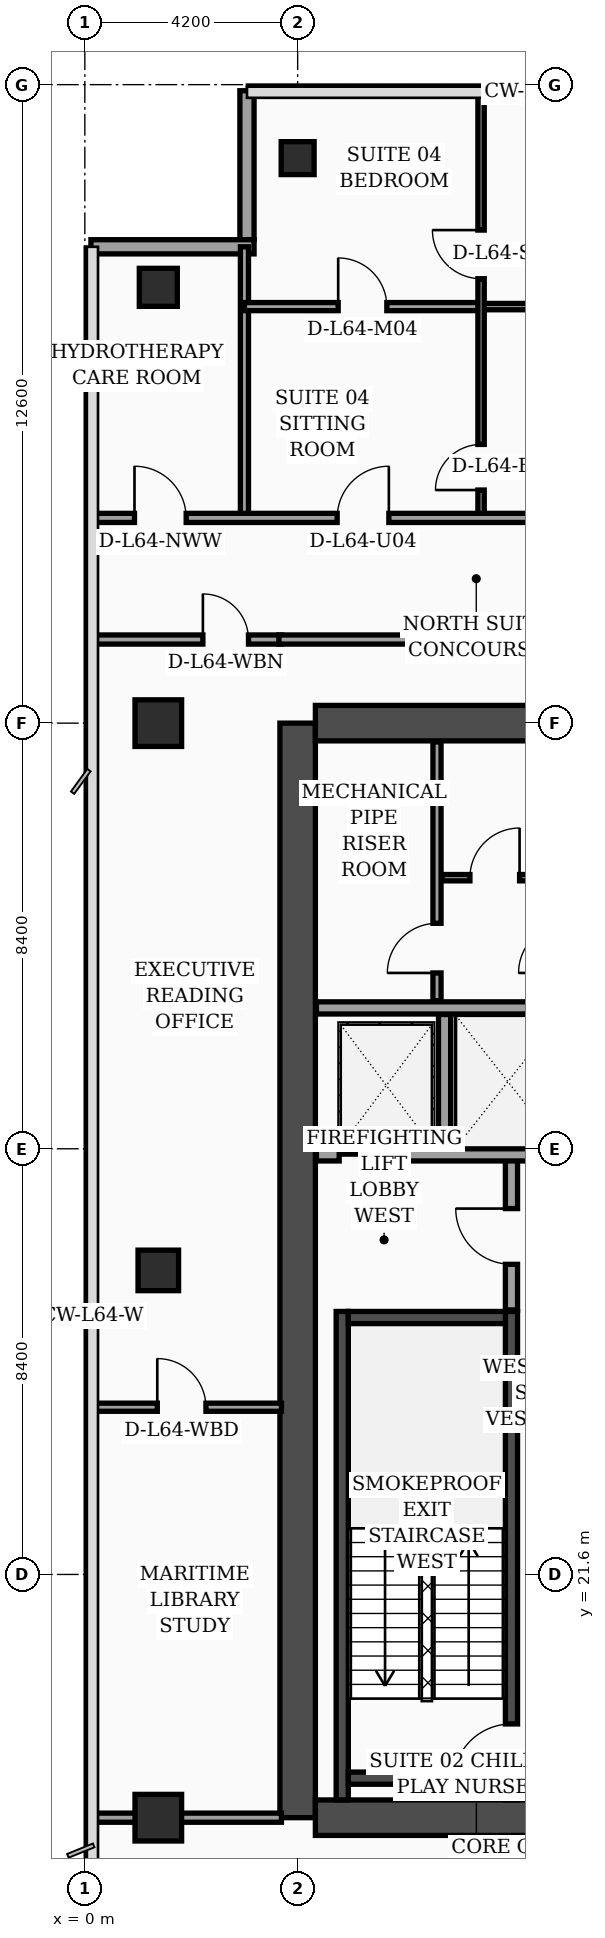
"""IFC4 building model, lengths in metres.
Left out: names, types, materials, properties, quantities, classifications, styles, units other than length and angle.
Written with IfcOpenShell. Run it as: python <this file> out.ifc"""

import sys

from ifc_helpers import new_model, si_unit, direction, frame, frame_2d, origin, origin_2d, place, context, subcontext, project, spatial, rectangle, hollow_rectangle, extrude, element, fill, save


model = new_model("IFC4")
c1 = context("Model", 3, precision=1e-05, world=origin(), true_north=direction((0.0, 1.0)))
c2 = subcontext(c1, "Body", "Model", "MODEL_VIEW")
j1 = project(units=[si_unit("LENGTHUNIT", "METRE"), si_unit("PLANEANGLEUNIT", "RADIAN")], contexts=[c1])
p1 = place(None, origin())
s1 = spatial("IfcSite", under=j1, at=p1, CompositionType="ELEMENT")
p2 = place(p1, origin())
s2 = spatial("IfcBuilding", under=s1, at=p2, CompositionType="ELEMENT")
p3 = place(p2, frame((0.0, 0.0, 259.0)))
s3 = spatial("IfcBuildingStorey", under=s2, at=p3, CompositionType="ELEMENT", Elevation=259.0)
p4 = place(p3, frame((4.2, 16.8, 0.0), z_axis=(0.0, 0.0, 1.0), x_axis=(0.0, 1.0, 0.0)))
e1 = element("IfcWall", 1, at=p4, inside=s3, PredefinedType="SHEAR", context=c2, shape_type="SweptSolid", body=[
    extrude(rectangle(XDim=21.6, YDim=0.7, at=frame_2d((10.8, 0.0))), origin(), (0.0, 0.0, 1.0), 4.05),
])
p5 = place(p3, frame((4.55, 38.4, 0.0), z_axis=(0.0, 0.0, 1.0), x_axis=(1.0, 0.0, 0.0)))
e2 = element("IfcWall", 2, at=p5, inside=s3, PredefinedType="SHEAR", context=c2, shape_type="SweptSolid", body=[
    extrude(rectangle(XDim=10.1, YDim=0.7, at=frame_2d((5.05, 0.0))), origin(), (0.0, 0.0, 1.0), 4.05),
])
p6 = place(p5, frame((5.75, 0.0, 0.0)))
e3 = element("IfcOpeningElement", 3, at=p6, cuts=e2, PredefinedType="OPENING", context=c2, shape_type="SweptSolid", body=[
    extrude(rectangle(XDim=1.1, YDim=2.2, at=frame_2d((0.55, 1.1))), frame((0.0, 0.36, 0.0), z_axis=(0.0, -1.0, 0.0), x_axis=(1.0, 0.0, 0.0)), (0.0, 0.0, 1.0), 0.72),
])
p7 = place(p3, frame((4.55, 16.8, 0.0), z_axis=(0.0, 0.0, 1.0), x_axis=(1.0, 0.0, 0.0)))
e4 = element("IfcWall", 4, at=p7, inside=s3, PredefinedType="SHEAR", context=c2, shape_type="SweptSolid", body=[
    extrude(rectangle(XDim=10.1, YDim=0.7, at=frame_2d((5.05, 0.0))), origin(), (0.0, 0.0, 1.0), 4.05),
])
p8 = place(p3, frame((5.08, 17.15, 0.0), z_axis=(0.0, 0.0, 1.0), x_axis=(0.0, 1.0, 0.0)))
e5 = element("IfcWall", 5, at=p8, inside=s3, PredefinedType="SOLIDWALL", context=c2, shape_type="SweptSolid", body=[
    extrude(rectangle(XDim=9.64, YDim=0.24, at=frame_2d((4.82, 0.0))), origin(), (0.0, 0.0, 1.0), 4.05),
])
p9 = place(p3, frame((8.42, 17.15, 0.0), z_axis=(0.0, 0.0, 1.0), x_axis=(0.0, 1.0, 0.0)))
e6 = element("IfcWall", 6, at=p9, inside=s3, PredefinedType="SOLIDWALL", context=c2, shape_type="SweptSolid", body=[
    extrude(rectangle(XDim=9.64, YDim=0.24, at=frame_2d((4.82, 0.0))), origin(), (0.0, 0.0, 1.0), 4.05),
])
p10 = place(p9, frame((0.35, 0.0, 0.0)))
e7 = element("IfcOpeningElement", 7, at=p10, cuts=e6, PredefinedType="OPENING", context=c2, shape_type="SweptSolid", body=[
    extrude(rectangle(XDim=1.15, YDim=2.2, at=frame_2d((0.575, 1.1))), frame((0.0, 0.13, 0.0), z_axis=(0.0, -1.0, 0.0), x_axis=(1.0, 0.0, 0.0)), (0.0, 0.0, 1.0), 0.26),
])
for number, where, z_axis, x_axis in (
    (8, (5.2, 17.58, 0.0), (0.0, 0.0, 1.0), (1.0, 0.0, 0.0)),
    (9, (5.2, 26.67, 0.0), (0.0, 0.0, 1.0), (1.0, 0.0, 0.0)),
):
    element("IfcWall", number, at=place(p3, frame(where, z_axis=z_axis, x_axis=x_axis)), inside=s3, PredefinedType="SOLIDWALL", context=c2, shape_type="SweptSolid", body=[
        extrude(rectangle(XDim=3.1, YDim=0.24, at=frame_2d((1.55, 0.0))), origin(), (0.0, 0.0, 1.0), 4.05),
    ])
p11 = place(p3, frame((1.45, 16.8, 0.0), z_axis=(0.0, 0.0, 1.0), x_axis=(1.0, 0.0, 0.0)))
e10 = element("IfcColumn", 10, at=p11, inside=s3, PredefinedType="COLUMN", context=c2, shape_type="SweptSolid", body=[
    extrude(rectangle(XDim=0.92, YDim=0.92, at=origin_2d()), origin(), (0.0, 0.0, 1.0), 4.05),
])
p12 = place(p3, frame((1.45, 27.6, 0.0), z_axis=(0.0, 0.0, 1.0), x_axis=(1.0, 0.0, 0.0)))
e11 = element("IfcColumn", 11, at=p12, inside=s3, PredefinedType="COLUMN", context=c2, shape_type="SweptSolid", body=[
    extrude(rectangle(XDim=0.8, YDim=0.8, at=origin_2d()), origin(), (0.0, 0.0, 1.0), 4.05),
])
p13 = place(p3, frame((1.45, 38.4, 0.0), z_axis=(0.0, 0.0, 1.0), x_axis=(1.0, 0.0, 0.0)))
e12 = element("IfcColumn", 12, at=p13, inside=s3, PredefinedType="COLUMN", context=c2, shape_type="SweptSolid", body=[
    extrude(rectangle(XDim=0.92, YDim=0.92, at=origin_2d()), origin(), (0.0, 0.0, 1.0), 4.05),
])
p14 = place(p3, frame((1.45, 47.0, 0.0), z_axis=(0.0, 0.0, 1.0), x_axis=(1.0, 0.0, 0.0)))
e13 = element("IfcColumn", 13, at=p14, inside=s3, PredefinedType="COLUMN", context=c2, shape_type="SweptSolid", body=[
    extrude(hollow_rectangle(XDim=0.75, YDim=0.75, WallThickness=0.032, at=origin_2d()), origin(), (0.0, 0.0, 1.0), 4.05),
])
p15 = place(p3, frame((4.2, 49.55, 0.0), z_axis=(0.0, 0.0, 1.0), x_axis=(1.0, 0.0, 0.0)))
e14 = element("IfcColumn", 14, at=p15, inside=s3, PredefinedType="COLUMN", context=c2, shape_type="SweptSolid", body=[
    extrude(hollow_rectangle(XDim=0.65, YDim=0.65, WallThickness=0.028, at=origin_2d()), origin(), (0.0, 0.0, 1.0), 4.05),
])
p16 = place(p3, frame((3.2, 50.88, 0.0), z_axis=(0.0, 0.0, 1.0), x_axis=(0.0, -1.0, 0.0)))
e15 = element("IfcWall", 15, at=p16, inside=s3, PredefinedType="SOLIDWALL", context=c2, shape_type="SweptSolid", body=[
    extrude(rectangle(XDim=2.94, YDim=0.28, at=frame_2d((1.47, 0.0))), origin(), (0.0, 0.0, 1.0), 3.6),
])
p17 = place(p3, frame((3.34, 47.8, 0.0), z_axis=(0.0, 0.0, 1.0), x_axis=(-1.0, 0.0, 0.0)))
e16 = element("IfcWall", 16, at=p17, inside=s3, PredefinedType="SOLIDWALL", context=c2, shape_type="SweptSolid", body=[
    extrude(rectangle(XDim=3.22, YDim=0.28, at=frame_2d((1.61, 0.0))), origin(), (0.0, 0.0, 1.0), 3.6),
])
p18 = place(p3, frame((8.42, 26.82, 0.0), z_axis=(0.0, 0.0, 1.0), x_axis=(0.0, 1.0, 0.0)))
e17 = element("IfcWall", 17, at=p18, inside=s3, PredefinedType="SOLIDWALL", context=c2, shape_type="SweptSolid", body=[
    extrude(rectangle(XDim=3.0, YDim=0.24, at=frame_2d((1.5, 0.0))), origin(), (0.0, 0.0, 1.0), 4.05),
])
p19 = place(p18, frame((0.9, 0.0, 0.0)))
e18 = element("IfcOpeningElement", 18, at=p19, cuts=e17, PredefinedType="OPENING", context=c2, shape_type="SweptSolid", body=[
    extrude(rectangle(XDim=1.1, YDim=2.2, at=frame_2d((0.55, 1.1))), frame((0.0, 0.13, 0.0), z_axis=(0.0, -1.0, 0.0), x_axis=(1.0, 0.0, 0.0)), (0.0, 0.0, 1.0), 0.26),
])
p20 = place(p3, frame((4.57, 29.88, 0.0), z_axis=(0.0, 0.0, 1.0), x_axis=(1.0, 0.0, 0.0)))
e19 = element("IfcWall", 19, at=p20, inside=s3, PredefinedType="SOLIDWALL", context=c2, shape_type="SweptSolid", body=[
    extrude(rectangle(XDim=4.85, YDim=0.24, at=frame_2d((2.425, 0.0))), origin(), (0.0, 0.0, 1.0), 4.05),
])
p21 = place(p20, frame((0.45, 0.0, 0.0)))
e20 = element("IfcOpeningElement", 20, at=p21, cuts=e19, PredefinedType="OPENING", context=c2, shape_type="SweptSolid", body=[
    extrude(rectangle(XDim=1.3, YDim=2.35, at=frame_2d((0.65, 1.175))), frame((0.0, 0.13, 0.0), z_axis=(0.0, -1.0, 0.0), x_axis=(1.0, 0.0, 0.0)), (0.0, 0.0, 1.0), 0.26),
])
p22 = place(p3, frame((7.1, 30.02, 0.0), z_axis=(0.0, 0.0, 1.0), x_axis=(0.0, 1.0, 0.0)))
e21 = element("IfcWall", 21, at=p22, inside=s3, PredefinedType="SOLIDWALL", context=c2, shape_type="SweptSolid", body=[
    extrude(rectangle(XDim=2.63, YDim=0.24, at=frame_2d((1.315, 0.0))), origin(), (0.0, 0.0, 1.0), 4.05),
])
p23 = place(p3, frame((4.57, 32.78, 0.0), z_axis=(0.0, 0.0, 1.0), x_axis=(1.0, 0.0, 0.0)))
e22 = element("IfcWall", 22, at=p23, inside=s3, PredefinedType="SOLIDWALL", context=c2, shape_type="SweptSolid", body=[
    extrude(rectangle(XDim=4.85, YDim=0.24, at=frame_2d((2.425, 0.0))), origin(), (0.0, 0.0, 1.0), 3.7),
])
p24 = place(p3, frame((6.95, 32.92, 0.0), z_axis=(0.0, 0.0, 1.0), x_axis=(0.0, 1.0, 0.0)))
e23 = element("IfcWall", 23, at=p24, inside=s3, PredefinedType="PARTITIONING", context=c2, shape_type="SweptSolid", body=[
    extrude(rectangle(XDim=5.11, YDim=0.16, at=frame_2d((2.555, 0.0))), origin(), (0.0, 0.0, 1.0), 4.05),
])
p25 = place(p24, frame((0.55, 0.0, 0.0)))
e24 = element("IfcOpeningElement", 24, at=p25, cuts=e23, PredefinedType="OPENING", context=c2, shape_type="SweptSolid", body=[
    extrude(rectangle(XDim=0.98, YDim=2.15, at=frame_2d((0.49, 1.075))), frame((0.0, 0.09, 0.0), z_axis=(0.0, -1.0, 0.0), x_axis=(1.0, 0.0, 0.0)), (0.0, 0.0, 1.0), 0.18),
])
p26 = place(p3, frame((7.05, 35.35, 0.0), z_axis=(0.0, 0.0, 1.0), x_axis=(1.0, 0.0, 0.0)))
e25 = element("IfcWall", 25, at=p26, inside=s3, PredefinedType="PARTITIONING", context=c2, shape_type="SweptSolid", body=[
    extrude(rectangle(XDim=2.37, YDim=0.125, at=frame_2d((1.185, 0.0))), origin(), (0.0, 0.0, 1.0), 4.05),
])
p27 = place(p26, frame((0.55, 0.0, 0.0)))
e26 = element("IfcOpeningElement", 26, at=p27, cuts=e25, PredefinedType="OPENING", context=c2, shape_type="SweptSolid", body=[
    extrude(rectangle(XDim=0.98, YDim=2.15, at=frame_2d((0.49, 1.075))), frame((0.0, 0.073, 0.0), z_axis=(0.0, -1.0, 0.0), x_axis=(1.0, 0.0, 0.0)), (0.0, 0.0, 1.0), 0.145),
])
p28 = place(p3, frame((0.08, 24.9, 0.0), z_axis=(0.0, 0.0, 1.0), x_axis=(1.0, 0.0, 0.0)))
e27 = element("IfcWall", 27, at=p28, inside=s3, PredefinedType="PARTITIONING", context=c2, shape_type="SweptSolid", body=[
    extrude(rectangle(XDim=3.8, YDim=0.16, at=frame_2d((1.9, 0.0))), origin(), (0.0, 0.0, 1.0), 3.6),
])
p29 = place(p28, frame((1.35, 0.0, 0.0)))
e28 = element("IfcOpeningElement", 28, at=p29, cuts=e27, PredefinedType="OPENING", context=c2, shape_type="SweptSolid", body=[
    extrude(rectangle(XDim=0.96, YDim=2.2, at=frame_2d((0.48, 1.1))), frame((0.0, 0.09, 0.0), z_axis=(0.0, -1.0, 0.0), x_axis=(1.0, 0.0, 0.0)), (0.0, 0.0, 1.0), 0.18),
])
p30 = place(p3, frame((0.08, 16.8, 0.0), z_axis=(0.0, 0.0, 1.0), x_axis=(1.0, 0.0, 0.0)))
e29 = element("IfcWall", 29, at=p30, inside=s3, PredefinedType="PARTITIONING", context=c2, shape_type="SweptSolid", body=[
    extrude(rectangle(XDim=3.8, YDim=0.18, at=frame_2d((1.9, 0.0))), origin(), (0.0, 0.0, 1.0), 3.5),
])
p31 = place(p3, frame((0.08, 40.05, 0.0), z_axis=(0.0, 0.0, 1.0), x_axis=(1.0, 0.0, 0.0)))
e30 = element("IfcWall", 30, at=p31, inside=s3, PredefinedType="PARTITIONING", context=c2, shape_type="SweptSolid", body=[
    extrude(rectangle(XDim=3.8, YDim=0.18, at=frame_2d((1.9, 0.0))), origin(), (0.0, 0.0, 1.0), 3.5),
])
p32 = place(p31, frame((2.25, 0.0, 0.0)))
e31 = element("IfcOpeningElement", 31, at=p32, cuts=e30, PredefinedType="OPENING", context=c2, shape_type="SweptSolid", body=[
    extrude(rectangle(XDim=0.9, YDim=2.15, at=frame_2d((0.45, 1.075))), frame((0.0, 0.1, 0.0), z_axis=(0.0, -1.0, 0.0), x_axis=(1.0, 0.0, 0.0)), (0.0, 0.0, 1.0), 0.2),
])
p33 = place(p3, frame((3.15, 42.45, 0.0), z_axis=(0.0, 0.0, 1.0), x_axis=(0.0, 1.0, 0.0)))
e32 = element("IfcWall", 32, at=p33, inside=s3, PredefinedType="PARTITIONING", context=c2, shape_type="SweptSolid", body=[
    extrude(rectangle(XDim=5.35, YDim=0.16, at=frame_2d((2.675, 0.0))), origin(), (0.0, 0.0, 1.0), 3.65),
])
p34 = place(p3, frame((7.82, 46.62, 0.0), z_axis=(0.0, 0.0, 1.0), x_axis=(1.0, 0.0, 0.0)))
e33 = element("IfcWall", 33, at=p34, inside=s3, PredefinedType="PARTITIONING", context=c2, shape_type="SweptSolid", body=[
    extrude(rectangle(XDim=1.93, YDim=0.125, at=frame_2d((0.965, 0.0))), origin(), (0.0, 0.0, 1.0), 4.05),
])
p35 = place(p3, frame((3.15, 46.62, 0.0), z_axis=(0.0, 0.0, 1.0), x_axis=(1.0, 0.0, 0.0)))
e34 = element("IfcWall", 34, at=p35, inside=s3, PredefinedType="PARTITIONING", context=c2, shape_type="SweptSolid", body=[
    extrude(rectangle(XDim=4.67, YDim=0.16, at=frame_2d((2.335, 0.0))), origin(), (0.0, 0.0, 1.0), 3.5),
])
p36 = place(p35, frame((1.85, 0.0, 0.0)))
e35 = element("IfcOpeningElement", 35, at=p36, cuts=e34, PredefinedType="OPENING", context=c2, shape_type="SweptSolid", body=[
    extrude(rectangle(XDim=0.96, YDim=2.2, at=frame_2d((0.48, 1.1))), frame((0.0, 0.09, 0.0), z_axis=(0.0, -1.0, 0.0), x_axis=(1.0, 0.0, 0.0)), (0.0, 0.0, 1.0), 0.18),
])
p37 = place(p3, frame((7.82, 42.45, 0.0), z_axis=(0.0, 0.0, 1.0), x_axis=(0.0, 1.0, 0.0)))
e36 = element("IfcWall", 36, at=p37, inside=s3, PredefinedType="PARTITIONING", context=c2, shape_type="SweptSolid", body=[
    extrude(rectangle(XDim=8.49, YDim=0.125, at=frame_2d((4.245, 0.0))), origin(), (0.0, 0.0, 1.0), 3.6),
])
p38 = place(p37, frame((0.55, 0.0, 0.0)))
e37 = element("IfcOpeningElement", 37, at=p38, cuts=e36, PredefinedType="OPENING", context=c2, shape_type="SweptSolid", body=[
    extrude(rectangle(XDim=0.9, YDim=2.15, at=frame_2d((0.45, 1.075))), frame((0.0, 0.073, 0.0), z_axis=(0.0, -1.0, 0.0), x_axis=(1.0, 0.0, 0.0)), (0.0, 0.0, 1.0), 0.145),
])
p39 = place(p37, frame((4.72, 0.0, 0.0)))
e38 = element("IfcOpeningElement", 38, at=p39, cuts=e36, PredefinedType="OPENING", context=c2, shape_type="SweptSolid", body=[
    extrude(rectangle(XDim=0.96, YDim=2.2, at=frame_2d((0.48, 1.1))), frame((0.0, 0.073, 0.0), z_axis=(0.0, -1.0, 0.0), x_axis=(1.0, 0.0, 0.0)), (0.0, 0.0, 1.0), 0.145),
])
p40 = place(p3, frame((0.08, 42.45, 0.0), z_axis=(0.0, 0.0, 1.0), x_axis=(1.0, 0.0, 0.0)))
e39 = element("IfcWall", 39, at=p40, inside=s3, PredefinedType="PARTITIONING", context=c2, shape_type="SweptSolid", body=[
    extrude(rectangle(XDim=17.77, YDim=0.18, at=frame_2d((8.885, 0.0))), origin(), (0.0, 0.0, 1.0), 3.5),
])
p41 = place(p40, frame((0.9, 0.0, 0.0)))
e40 = element("IfcOpeningElement", 40, at=p41, cuts=e39, PredefinedType="OPENING", context=c2, shape_type="SweptSolid", body=[
    extrude(rectangle(XDim=1.02, YDim=2.2, at=frame_2d((0.51, 1.1))), frame((0.0, 0.1, 0.0), z_axis=(0.0, -1.0, 0.0), x_axis=(1.0, 0.0, 0.0)), (0.0, 0.0, 1.0), 0.2),
])
p42 = place(p40, frame((4.9, 0.0, 0.0)))
e41 = element("IfcOpeningElement", 41, at=p42, cuts=e39, PredefinedType="OPENING", context=c2, shape_type="SweptSolid", body=[
    extrude(rectangle(XDim=1.02, YDim=2.2, at=frame_2d((0.51, 1.1))), frame((0.0, 0.1, 0.0), z_axis=(0.0, -1.0, 0.0), x_axis=(1.0, 0.0, 0.0)), (0.0, 0.0, 1.0), 0.2),
])
p43 = place(p40, frame((10.78, 0.0, 0.0)))
e42 = element("IfcOpeningElement", 42, at=p43, cuts=e39, PredefinedType="OPENING", context=c2, shape_type="SweptSolid", body=[
    extrude(rectangle(XDim=1.02, YDim=2.2, at=frame_2d((0.51, 1.1))), frame((0.0, 0.1, 0.0), z_axis=(0.0, -1.0, 0.0), x_axis=(1.0, 0.0, 0.0)), (0.0, 0.0, 1.0), 0.2),
])
p44 = place(p40, frame((15.55, 0.0, 0.0)))
e43 = element("IfcOpeningElement", 43, at=p44, cuts=e39, PredefinedType="OPENING", context=c2, shape_type="SweptSolid", body=[
    extrude(rectangle(XDim=1.02, YDim=2.2, at=frame_2d((0.51, 1.1))), frame((0.0, 0.1, 0.0), z_axis=(0.0, -1.0, 0.0), x_axis=(1.0, 0.0, 0.0)), (0.0, 0.0, 1.0), 0.2),
])
p45 = place(p3, frame((3.83, 40.05, 0.0), z_axis=(0.0, 0.0, 1.0), x_axis=(1.0, 0.0, 0.0)))
e44 = element("IfcWall", 44, at=p45, inside=s3, PredefinedType="PARTITIONING", context=c2, shape_type="SweptSolid", body=[
    extrude(rectangle(XDim=11.32, YDim=0.18, at=frame_2d((5.66, 0.0))), origin(), (0.0, 0.0, 1.0), 3.5),
])
p46 = place(p19, origin())
e45 = element("IfcDoor", 45, at=p46, inside=s3, OperationType="SINGLE_SWING_RIGHT", PredefinedType="DOOR", context=c2, shape_type="SweptSolid", body=[
    extrude(rectangle(XDim=1.1, YDim=2.2, at=frame_2d((0.55, 1.1))), frame((0.0, 0.025, 0.0), z_axis=(0.0, -1.0, 0.0), x_axis=(1.0, 0.0, 0.0)), (0.0, 0.0, 1.0), 0.05),
])
fill(e18, e45)
p47 = place(p21, origin())
e46 = element("IfcDoor", 46, at=p47, inside=s3, OperationType="DOUBLE_DOOR_SLIDING", PredefinedType="DOOR", context=c2, shape_type="SweptSolid", body=[
    extrude(rectangle(XDim=1.3, YDim=2.35, at=frame_2d((0.65, 1.175))), frame((0.0, 0.025, 0.0), z_axis=(0.0, -1.0, 0.0), x_axis=(1.0, 0.0, 0.0)), (0.0, 0.0, 1.0), 0.05),
])
fill(e20, e46)
p48 = place(p25, origin())
e47 = element("IfcDoor", 47, at=p48, inside=s3, OperationType="SINGLE_SWING_LEFT", PredefinedType="DOOR", context=c2, shape_type="SweptSolid", body=[
    extrude(rectangle(XDim=0.98, YDim=2.15, at=frame_2d((0.49, 1.075))), frame((0.0, 0.025, 0.0), z_axis=(0.0, -1.0, 0.0), x_axis=(1.0, 0.0, 0.0)), (0.0, 0.0, 1.0), 0.05),
])
fill(e24, e47)
p49 = place(p27, origin())
e48 = element("IfcDoor", 48, at=p49, inside=s3, OperationType="SINGLE_SWING_RIGHT", PredefinedType="DOOR", context=c2, shape_type="SweptSolid", body=[
    extrude(rectangle(XDim=0.98, YDim=2.15, at=frame_2d((0.49, 1.075))), frame((0.0, 0.025, 0.0), z_axis=(0.0, -1.0, 0.0), x_axis=(1.0, 0.0, 0.0)), (0.0, 0.0, 1.0), 0.05),
])
fill(e26, e48)
p50 = place(p29, origin())
e49 = element("IfcDoor", 49, at=p50, inside=s3, OperationType="SINGLE_SWING_LEFT", PredefinedType="DOOR", context=c2, shape_type="SweptSolid", body=[
    extrude(rectangle(XDim=0.96, YDim=2.2, at=frame_2d((0.48, 1.1))), frame((0.0, 0.025, 0.0), z_axis=(0.0, -1.0, 0.0), x_axis=(1.0, 0.0, 0.0)), (0.0, 0.0, 1.0), 0.05),
])
fill(e28, e49)
p51 = place(p32, origin())
e50 = element("IfcDoor", 50, at=p51, inside=s3, OperationType="SINGLE_SWING_LEFT", PredefinedType="DOOR", context=c2, shape_type="SweptSolid", body=[
    extrude(rectangle(XDim=0.9, YDim=2.15, at=frame_2d((0.45, 1.075))), frame((0.0, 0.025, 0.0), z_axis=(0.0, -1.0, 0.0), x_axis=(1.0, 0.0, 0.0)), (0.0, 0.0, 1.0), 0.05),
])
fill(e31, e50)
p52 = place(p36, origin())
e51 = element("IfcDoor", 51, at=p52, inside=s3, OperationType="SINGLE_SWING_LEFT", PredefinedType="DOOR", context=c2, shape_type="SweptSolid", body=[
    extrude(rectangle(XDim=0.96, YDim=2.2, at=frame_2d((0.48, 1.1))), frame((0.0, 0.025, 0.0), z_axis=(0.0, -1.0, 0.0), x_axis=(1.0, 0.0, 0.0)), (0.0, 0.0, 1.0), 0.05),
])
fill(e35, e51)
p53 = place(p38, origin())
e52 = element("IfcDoor", 52, at=p53, inside=s3, OperationType="SINGLE_SWING_LEFT", PredefinedType="DOOR", context=c2, shape_type="SweptSolid", body=[
    extrude(rectangle(XDim=0.9, YDim=2.15, at=frame_2d((0.45, 1.075))), frame((0.0, 0.025, 0.0), z_axis=(0.0, -1.0, 0.0), x_axis=(1.0, 0.0, 0.0)), (0.0, 0.0, 1.0), 0.05),
])
fill(e37, e52)
p54 = place(p39, origin())
e53 = element("IfcDoor", 53, at=p54, inside=s3, OperationType="SINGLE_SWING_RIGHT", PredefinedType="DOOR", context=c2, shape_type="SweptSolid", body=[
    extrude(rectangle(XDim=0.96, YDim=2.2, at=frame_2d((0.48, 1.1))), frame((0.0, 0.025, 0.0), z_axis=(0.0, -1.0, 0.0), x_axis=(1.0, 0.0, 0.0)), (0.0, 0.0, 1.0), 0.05),
])
fill(e38, e53)
p55 = place(p41, origin())
e54 = element("IfcDoor", 54, at=p55, inside=s3, OperationType="SINGLE_SWING_LEFT", PredefinedType="DOOR", context=c2, shape_type="SweptSolid", body=[
    extrude(rectangle(XDim=1.02, YDim=2.2, at=frame_2d((0.51, 1.1))), frame((0.0, 0.025, 0.0), z_axis=(0.0, -1.0, 0.0), x_axis=(1.0, 0.0, 0.0)), (0.0, 0.0, 1.0), 0.05),
])
fill(e40, e54)
p56 = place(p42, origin())
e55 = element("IfcDoor", 55, at=p56, inside=s3, OperationType="SINGLE_SWING_RIGHT", PredefinedType="DOOR", context=c2, shape_type="SweptSolid", body=[
    extrude(rectangle(XDim=1.02, YDim=2.2, at=frame_2d((0.51, 1.1))), frame((0.0, 0.025, 0.0), z_axis=(0.0, -1.0, 0.0), x_axis=(1.0, 0.0, 0.0)), (0.0, 0.0, 1.0), 0.05),
])
fill(e41, e55)
p57 = place(p10, origin())
e56 = element("IfcDoor", 56, at=p57, inside=s3, OperationType="SINGLE_SWING_LEFT", PredefinedType="DOOR", context=c2, shape_type="SweptSolid", body=[
    extrude(rectangle(XDim=1.15, YDim=2.2, at=frame_2d((0.575, 1.1))), frame((0.0, 0.025, 0.0), z_axis=(0.0, -1.0, 0.0), x_axis=(1.0, 0.0, 0.0)), (0.0, 0.0, 1.0), 0.05),
])
fill(e7, e56)
save(model, sys.argv[1])
